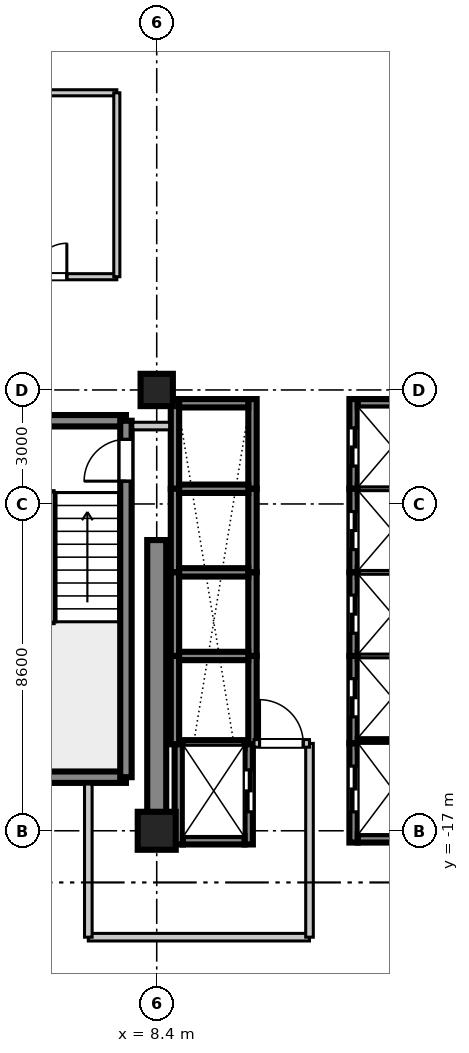
"""IFC4 building model, lengths in metres.
Left out: names, types, materials, properties, quantities, classifications, styles, units other than length and angle.
Written with IfcOpenShell. Run it as: python <this file> out.ifc"""

import sys

from ifc_helpers import new_model, si_unit, direction, frame, frame_2d, origin, origin_2d, place, context, subcontext, project, spatial, rectangle, extrude, source, transform, mapped, element, fill, save


model = new_model("IFC4")
c1 = context("Model", 3, precision=1e-05, world=origin(), true_north=direction((0.0, 1.0)))
c2 = subcontext(c1, "Body", "Model", "MODEL_VIEW")
j1 = project(units=[si_unit("LENGTHUNIT", "METRE"), si_unit("PLANEANGLEUNIT", "RADIAN")], contexts=[c1])
p1 = place(None, origin())
s1 = spatial("IfcSite", under=j1, at=p1, CompositionType="ELEMENT")
p2 = place(p1, origin())
s2 = spatial("IfcBuilding", under=s1, at=p2, CompositionType="ELEMENT")
p3 = place(p2, frame((0.0, 0.0, 212.3)))
s3 = spatial("IfcBuildingStorey", under=s2, at=p3, CompositionType="ELEMENT", Elevation=212.3)
m1 = source(origin(), c2, "Body", "SweptSolid", [
    extrude(rectangle(XDim=1.0, YDim=1.0, at=origin_2d()), origin(), (0.0, 0.0, 1.0), 3.655),
])
p4 = place(p3, frame((8.4, -17.0, 0.0), z_axis=(0.0, 0.0, 1.0), x_axis=(1.0, 0.0, 0.0)))
e1 = element("IfcColumn", 1, at=p4, inside=s3, PredefinedType="COLUMN", context=c2, shape_type="MappedRepresentation", body=[
    mapped(m1, transform((0.0, 0.0, 0.0), scale=1.0)),
])
m2 = source(origin(), c2, "Body", "SweptSolid", [
    extrude(rectangle(XDim=0.85, YDim=0.85, at=origin_2d()), origin(), (0.0, 0.0, 1.0), 3.655),
])
p5 = place(p3, frame((8.4, -5.4, 0.0), z_axis=(0.0, 0.0, 1.0), x_axis=(1.0, 0.0, 0.0)))
e2 = element("IfcColumn", 2, at=p5, inside=s3, PredefinedType="PILASTER", context=c2, shape_type="MappedRepresentation", body=[
    mapped(m2, transform((0.0, 0.0, 0.0), scale=1.0)),
])
m3 = source(origin(), c2, "Body", "SweptSolid", [
    extrude(rectangle(XDim=7.65, YDim=0.5, at=frame_2d((3.825, 0.0))), origin(), (0.0, 0.0, 1.0), 3.41),
])
p6 = place(p3, frame((8.4, -17.0, 0.0), z_axis=(0.0, 0.0, 1.0), x_axis=(0.0, 1.0, 0.0)))
e3 = element("IfcWall", 3, at=p6, inside=s3, PredefinedType="SHEAR", context=c2, shape_type="MappedRepresentation", body=[
    mapped(m3, transform((0.0, 0.0, 0.0), scale=1.0)),
])
m4 = source(origin(), c2, "Body", "SweptSolid", [
    extrude(rectangle(XDim=3.98, YDim=0.3, at=frame_2d((1.99, 0.0))), origin(), (0.0, 0.0, 1.0), 3.41),
])
for number, where, z_axis, x_axis in (
    (4, (3.61, -15.59, 0.0), (0.0, 0.0, 1.0), (1.0, 0.0, 0.0)),
    (5, (3.61, -6.21, 0.0), (0.0, 0.0, 1.0), (1.0, 0.0, 0.0)),
):
    element("IfcWall", number, at=place(p3, frame(where, z_axis=z_axis, x_axis=x_axis)), inside=s3, PredefinedType="SHEAR", context=c2, shape_type="MappedRepresentation", body=[
        mapped(m4, transform((0.0, 0.0, 0.0), scale=1.0)),
    ])
m5 = source(origin(), c2, "Body", "SweptSolid", [
    extrude(rectangle(XDim=9.38, YDim=0.3, at=frame_2d((4.69, 0.0))), origin(), (0.0, 0.0, 1.0), 3.41),
])
p7 = place(p3, frame((7.59, -15.59, 0.0), z_axis=(0.0, 0.0, 1.0), x_axis=(0.0, 1.0, 0.0)))
e6 = element("IfcWall", 6, at=p7, inside=s3, PredefinedType="SHEAR", context=c2, shape_type="MappedRepresentation", body=[
    mapped(m5, transform((0.0, 0.0, 0.0), scale=1.0)),
])
p8 = place(p7, frame((7.79, 0.0, 0.0)))
e7 = element("IfcOpeningElement", 7, at=p8, cuts=e6, PredefinedType="OPENING", context=c2, shape_type="SweptSolid", body=[
    extrude(rectangle(XDim=1.1, YDim=2.15, at=frame_2d((0.55, 1.075))), frame((0.0, 0.16, 0.0), z_axis=(0.0, -1.0, 0.0), x_axis=(1.0, 0.0, 0.0)), (0.0, 0.0, 1.0), 0.32),
])
m6 = source(origin(), c2, "Body", "SweptSolid", [
    extrude(rectangle(XDim=2.36, YDim=0.22, at=frame_2d((1.18, 0.0))), origin(), (0.0, 0.0, 1.0), 3.41),
])
p9 = place(p3, frame((13.58, -8.0, 0.0), z_axis=(0.0, 0.0, 1.0), x_axis=(0.0, 1.0, 0.0)))
e8 = element("IfcWall", 8, at=p9, inside=s3, PredefinedType="SHEAR", context=c2, shape_type="MappedRepresentation", body=[
    mapped(m6, transform((0.0, 0.0, 0.0), scale=1.0)),
])
p10 = place(p9, frame((0.6, 0.0, 0.0)))
e9 = element("IfcOpeningElement", 9, at=p10, cuts=e8, PredefinedType="OPENING", context=c2, shape_type="SweptSolid", body=[
    extrude(rectangle(XDim=1.0, YDim=2.2, at=frame_2d((0.5, 1.1))), frame((0.0, 0.12, 0.0), z_axis=(0.0, -1.0, 0.0), x_axis=(1.0, 0.0, 0.0)), (0.0, 0.0, 1.0), 0.24),
])
m7 = source(origin(), c2, "Body", "SweptSolid", [
    extrude(rectangle(XDim=1.82, YDim=0.22, at=frame_2d((0.91, 0.0))), origin(), (0.0, 0.0, 1.0), 3.41),
])
p11 = place(p3, frame((13.69, -5.75, 0.0), z_axis=(0.0, 0.0, 1.0), x_axis=(1.0, 0.0, 0.0)))
e10 = element("IfcWall", 10, at=p11, inside=s3, PredefinedType="SHEAR", context=c2, shape_type="MappedRepresentation", body=[
    mapped(m7, transform((0.0, 0.0, 0.0), scale=1.0)),
])
m8 = source(origin(), c2, "Body", "SweptSolid", [
    extrude(rectangle(XDim=2.2, YDim=0.22, at=frame_2d((1.1, 0.0))), origin(), (0.0, 0.0, 1.0), 3.41),
])
p12 = place(p3, frame((13.58, -10.2, 0.0), z_axis=(0.0, 0.0, 1.0), x_axis=(0.0, 1.0, 0.0)))
e11 = element("IfcWall", 11, at=p12, inside=s3, PredefinedType="SHEAR", context=c2, shape_type="MappedRepresentation", body=[
    mapped(m8, transform((0.0, 0.0, 0.0), scale=1.0)),
])
p13 = place(p12, frame((0.6, 0.0, 0.0)))
e12 = element("IfcOpeningElement", 12, at=p13, cuts=e11, PredefinedType="OPENING", context=c2, shape_type="SweptSolid", body=[
    extrude(rectangle(XDim=1.0, YDim=2.2, at=frame_2d((0.5, 1.1))), frame((0.0, 0.12, 0.0), z_axis=(0.0, -1.0, 0.0), x_axis=(1.0, 0.0, 0.0)), (0.0, 0.0, 1.0), 0.24),
])
m9 = source(origin(), c2, "Body", "SweptSolid", [
    extrude(rectangle(XDim=1.82, YDim=0.22, at=frame_2d((0.91, 0.0))), origin(), (0.0, 0.0, 1.0), 3.7),
])
p14 = place(p3, frame((13.69, -8.0, 0.0), z_axis=(0.0, 0.0, 1.0), x_axis=(1.0, 0.0, 0.0)))
e13 = element("IfcWall", 13, at=p14, inside=s3, PredefinedType="SHEAR", context=c2, shape_type="MappedRepresentation", body=[
    mapped(m9, transform((0.0, 0.0, 0.0), scale=1.0)),
])
p15 = place(p3, frame((13.58, -12.4, 0.0), z_axis=(0.0, 0.0, 1.0), x_axis=(0.0, 1.0, 0.0)))
e14 = element("IfcWall", 14, at=p15, inside=s3, PredefinedType="SHEAR", context=c2, shape_type="MappedRepresentation", body=[
    mapped(m8, transform((0.0, 0.0, 0.0), scale=1.0)),
])
p16 = place(p15, frame((0.6, 0.0, 0.0)))
e15 = element("IfcOpeningElement", 15, at=p16, cuts=e14, PredefinedType="OPENING", context=c2, shape_type="SweptSolid", body=[
    extrude(rectangle(XDim=1.0, YDim=2.2, at=frame_2d((0.5, 1.1))), frame((0.0, 0.12, 0.0), z_axis=(0.0, -1.0, 0.0), x_axis=(1.0, 0.0, 0.0)), (0.0, 0.0, 1.0), 0.24),
])
p17 = place(p3, frame((13.69, -10.2, 0.0), z_axis=(0.0, 0.0, 1.0), x_axis=(1.0, 0.0, 0.0)))
e16 = element("IfcWall", 16, at=p17, inside=s3, PredefinedType="SHEAR", context=c2, shape_type="MappedRepresentation", body=[
    mapped(m9, transform((0.0, 0.0, 0.0), scale=1.0)),
])
m10 = source(origin(), c2, "Body", "SweptSolid", [
    extrude(rectangle(XDim=2.3, YDim=0.22, at=frame_2d((1.15, 0.0))), origin(), (0.0, 0.0, 1.0), 3.41),
])
p18 = place(p3, frame((13.58, -14.7, 0.0), z_axis=(0.0, 0.0, 1.0), x_axis=(0.0, 1.0, 0.0)))
e17 = element("IfcWall", 17, at=p18, inside=s3, PredefinedType="SHEAR", context=c2, shape_type="MappedRepresentation", body=[
    mapped(m10, transform((0.0, 0.0, 0.0), scale=1.0)),
])
p19 = place(p18, frame((0.7, 0.0, 0.0)))
e18 = element("IfcOpeningElement", 18, at=p19, cuts=e17, PredefinedType="OPENING", context=c2, shape_type="SweptSolid", body=[
    extrude(rectangle(XDim=1.0, YDim=2.2, at=frame_2d((0.5, 1.1))), frame((0.0, 0.12, 0.0), z_axis=(0.0, -1.0, 0.0), x_axis=(1.0, 0.0, 0.0)), (0.0, 0.0, 1.0), 0.24),
])
p20 = place(p3, frame((13.69, -12.4, 0.0), z_axis=(0.0, 0.0, 1.0), x_axis=(1.0, 0.0, 0.0)))
e19 = element("IfcWall", 19, at=p20, inside=s3, PredefinedType="SHEAR", context=c2, shape_type="MappedRepresentation", body=[
    mapped(m9, transform((0.0, 0.0, 0.0), scale=1.0)),
])
for number, where, z_axis, x_axis in (
    (20, (8.88, -8.0, 0.0), (0.0, 0.0, 1.0), (0.0, 1.0, 0.0)),
    (21, (10.92, -8.0, 0.0), (0.0, 0.0, 1.0), (0.0, 1.0, 0.0)),
):
    element("IfcWall", number, at=place(p3, frame(where, z_axis=z_axis, x_axis=x_axis)), inside=s3, PredefinedType="SHEAR", context=c2, shape_type="MappedRepresentation", body=[
        mapped(m6, transform((0.0, 0.0, 0.0), scale=1.0)),
    ])
p21 = place(p3, frame((8.99, -5.75, 0.0), z_axis=(0.0, 0.0, 1.0), x_axis=(1.0, 0.0, 0.0)))
e22 = element("IfcWall", 22, at=p21, inside=s3, PredefinedType="SHEAR", context=c2, shape_type="MappedRepresentation", body=[
    mapped(m7, transform((0.0, 0.0, 0.0), scale=1.0)),
])
for number, where, z_axis, x_axis in (
    (23, (8.88, -10.2, 0.0), (0.0, 0.0, 1.0), (0.0, 1.0, 0.0)),
    (24, (10.92, -10.2, 0.0), (0.0, 0.0, 1.0), (0.0, 1.0, 0.0)),
):
    element("IfcWall", number, at=place(p3, frame(where, z_axis=z_axis, x_axis=x_axis)), inside=s3, PredefinedType="SHEAR", context=c2, shape_type="MappedRepresentation", body=[
        mapped(m8, transform((0.0, 0.0, 0.0), scale=1.0)),
    ])
p22 = place(p3, frame((8.99, -8.0, 0.0), z_axis=(0.0, 0.0, 1.0), x_axis=(1.0, 0.0, 0.0)))
e25 = element("IfcWall", 25, at=p22, inside=s3, PredefinedType="SHEAR", context=c2, shape_type="MappedRepresentation", body=[
    mapped(m9, transform((0.0, 0.0, 0.0), scale=1.0)),
])
for number, where, z_axis, x_axis in (
    (26, (8.88, -12.4, 0.0), (0.0, 0.0, 1.0), (0.0, 1.0, 0.0)),
    (27, (10.92, -12.4, 0.0), (0.0, 0.0, 1.0), (0.0, 1.0, 0.0)),
):
    element("IfcWall", number, at=place(p3, frame(where, z_axis=z_axis, x_axis=x_axis)), inside=s3, PredefinedType="SHEAR", context=c2, shape_type="MappedRepresentation", body=[
        mapped(m8, transform((0.0, 0.0, 0.0), scale=1.0)),
    ])
p23 = place(p3, frame((8.99, -10.2, 0.0), z_axis=(0.0, 0.0, 1.0), x_axis=(1.0, 0.0, 0.0)))
e28 = element("IfcWall", 28, at=p23, inside=s3, PredefinedType="SHEAR", context=c2, shape_type="MappedRepresentation", body=[
    mapped(m9, transform((0.0, 0.0, 0.0), scale=1.0)),
])
m11 = source(origin(), c2, "Body", "SweptSolid", [
    extrude(rectangle(XDim=2.325, YDim=0.22, at=frame_2d((1.163, 0.0))), origin(), (0.0, 0.0, 1.0), 3.41),
])
for number, where, z_axis, x_axis in (
    (29, (8.88, -14.725, 0.0), (0.0, 0.0, 1.0), (0.0, 1.0, 0.0)),
    (30, (10.92, -14.725, 0.0), (0.0, 0.0, 1.0), (0.0, 1.0, 0.0)),
):
    element("IfcWall", number, at=place(p3, frame(where, z_axis=z_axis, x_axis=x_axis)), inside=s3, PredefinedType="SHEAR", context=c2, shape_type="MappedRepresentation", body=[
        mapped(m11, transform((0.0, 0.0, 0.0), scale=1.0)),
    ])
p24 = place(p3, frame((8.99, -12.4, 0.0), z_axis=(0.0, 0.0, 1.0), x_axis=(1.0, 0.0, 0.0)))
e31 = element("IfcWall", 31, at=p24, inside=s3, PredefinedType="SHEAR", context=c2, shape_type="MappedRepresentation", body=[
    mapped(m9, transform((0.0, 0.0, 0.0), scale=1.0)),
])
m12 = source(origin(), c2, "Body", "SweptSolid", [
    extrude(rectangle(XDim=2.635, YDim=0.22, at=frame_2d((1.317, 0.0))), origin(), (0.0, 0.0, 1.0), 3.41),
])
p25 = place(p3, frame((8.98, -17.36, 0.0), z_axis=(0.0, 0.0, 1.0), x_axis=(0.0, 1.0, 0.0)))
e32 = element("IfcWall", 32, at=p25, inside=s3, PredefinedType="SHEAR", context=c2, shape_type="MappedRepresentation", body=[
    mapped(m12, transform((0.0, 0.0, 0.0), scale=1.0)),
])
p26 = place(p3, frame((10.82, -17.36, 0.0), z_axis=(0.0, 0.0, 1.0), x_axis=(0.0, 1.0, 0.0)))
e33 = element("IfcWall", 33, at=p26, inside=s3, PredefinedType="SHEAR", context=c2, shape_type="MappedRepresentation", body=[
    mapped(m12, transform((0.0, 0.0, 0.0), scale=1.0)),
])
p27 = place(p26, frame((0.86, 0.0, 0.0)))
e34 = element("IfcOpeningElement", 34, at=p27, cuts=e33, PredefinedType="OPENING", context=c2, shape_type="SweptSolid", body=[
    extrude(rectangle(XDim=1.1, YDim=2.2, at=frame_2d((0.55, 1.1))), frame((0.0, 0.12, 0.0), z_axis=(0.0, -1.0, 0.0), x_axis=(1.0, 0.0, 0.0)), (0.0, 0.0, 1.0), 0.24),
])
m13 = source(origin(), c2, "Body", "SweptSolid", [
    extrude(rectangle(XDim=1.62, YDim=0.22, at=frame_2d((0.81, 0.0))), origin(), (0.0, 0.0, 1.0), 3.41),
])
p28 = place(p3, frame((9.09, -17.25, 0.0), z_axis=(0.0, 0.0, 1.0), x_axis=(1.0, 0.0, 0.0)))
e35 = element("IfcWall", 35, at=p28, inside=s3, PredefinedType="SHEAR", context=c2, shape_type="MappedRepresentation", body=[
    mapped(m13, transform((0.0, 0.0, 0.0), scale=1.0)),
])
m14 = source(origin(), c2, "Body", "SweptSolid", [
    extrude(rectangle(XDim=1.62, YDim=0.22, at=frame_2d((0.81, 0.0))), origin(), (0.0, 0.0, 1.0), 3.7),
])
p29 = place(p3, frame((9.09, -14.725, 0.0), z_axis=(0.0, 0.0, 1.0), x_axis=(1.0, 0.0, 0.0)))
e36 = element("IfcWall", 36, at=p29, inside=s3, PredefinedType="SHEAR", context=c2, shape_type="MappedRepresentation", body=[
    mapped(m14, transform((0.0, 0.0, 0.0), scale=1.0)),
])
m15 = source(origin(), c2, "Body", "SweptSolid", [
    extrude(rectangle(XDim=2.61, YDim=0.22, at=frame_2d((1.305, 0.0))), origin(), (0.0, 0.0, 1.0), 3.41),
])
p30 = place(p3, frame((13.58, -17.31, 0.0), z_axis=(0.0, 0.0, 1.0), x_axis=(0.0, 1.0, 0.0)))
e37 = element("IfcWall", 37, at=p30, inside=s3, PredefinedType="SHEAR", context=c2, shape_type="MappedRepresentation", body=[
    mapped(m15, transform((0.0, 0.0, 0.0), scale=1.0)),
])
p31 = place(p30, frame((0.81, 0.0, 0.0)))
e38 = element("IfcOpeningElement", 38, at=p31, cuts=e37, PredefinedType="OPENING", context=c2, shape_type="SweptSolid", body=[
    extrude(rectangle(XDim=1.2, YDim=2.2, at=frame_2d((0.6, 1.1))), frame((0.0, 0.12, 0.0), z_axis=(0.0, -1.0, 0.0), x_axis=(1.0, 0.0, 0.0)), (0.0, 0.0, 1.0), 0.24),
])
p32 = place(p3, frame((13.69, -17.2, 0.0), z_axis=(0.0, 0.0, 1.0), x_axis=(1.0, 0.0, 0.0)))
e39 = element("IfcWall", 39, at=p32, inside=s3, PredefinedType="SHEAR", context=c2, shape_type="MappedRepresentation", body=[
    mapped(m7, transform((0.0, 0.0, 0.0), scale=1.0)),
])
p33 = place(p3, frame((13.69, -14.7, 0.0), z_axis=(0.0, 0.0, 1.0), x_axis=(1.0, 0.0, 0.0)))
e40 = element("IfcWall", 40, at=p33, inside=s3, PredefinedType="SHEAR", context=c2, shape_type="MappedRepresentation", body=[
    mapped(m9, transform((0.0, 0.0, 0.0), scale=1.0)),
])
m16 = source(origin(), c2, "Body", "SweptSolid", [
    extrude(rectangle(XDim=5.82, YDim=0.2, at=frame_2d((2.91, 0.0))), origin(), (0.0, 0.0, 1.0), 2.75),
])
p34 = place(p3, frame((6.6, -19.8, 0.0), z_axis=(0.0, 0.0, 1.0), x_axis=(1.0, 0.0, 0.0)))
e41 = element("IfcWall", 41, at=p34, inside=s3, PredefinedType="PARTITIONING", context=c2, shape_type="MappedRepresentation", body=[
    mapped(m16, transform((0.0, 0.0, 0.0), scale=1.0)),
])
m17 = source(origin(), c2, "Body", "SweptSolid", [
    extrude(rectangle(XDim=4.03, YDim=0.2, at=frame_2d((2.015, 0.0))), origin(), (0.0, 0.0, 1.0), 2.75),
])
p35 = place(p3, frame((6.6, -19.8, 0.0), z_axis=(0.0, 0.0, 1.0), x_axis=(0.0, 1.0, 0.0)))
e42 = element("IfcWall", 42, at=p35, inside=s3, PredefinedType="PARTITIONING", context=c2, shape_type="MappedRepresentation", body=[
    mapped(m17, transform((0.0, 0.0, 0.0), scale=1.0)),
])
m18 = source(origin(), c2, "Body", "SweptSolid", [
    extrude(rectangle(XDim=5.1, YDim=0.2, at=frame_2d((2.55, 0.0))), origin(), (0.0, 0.0, 1.0), 2.75),
])
p36 = place(p3, frame((12.42, -19.8, 0.0), z_axis=(0.0, 0.0, 1.0), x_axis=(0.0, 1.0, 0.0)))
e43 = element("IfcWall", 43, at=p36, inside=s3, PredefinedType="PARTITIONING", context=c2, shape_type="MappedRepresentation", body=[
    mapped(m18, transform((0.0, 0.0, 0.0), scale=1.0)),
])
m19 = source(origin(), c2, "Body", "SweptSolid", [
    extrude(rectangle(XDim=1.46, YDim=0.2, at=frame_2d((0.73, 0.0))), origin(), (0.0, 0.0, 1.0), 2.75),
])
p37 = place(p3, frame((10.96, -14.7, 0.0), z_axis=(0.0, 0.0, 1.0), x_axis=(1.0, 0.0, 0.0)))
e44 = element("IfcWall", 44, at=p37, inside=s3, PredefinedType="PARTITIONING", context=c2, shape_type="MappedRepresentation", body=[
    mapped(m19, transform((0.0, 0.0, 0.0), scale=1.0)),
])
p38 = place(p37, frame((0.145, 0.0, 0.0)))
e45 = element("IfcOpeningElement", 45, at=p38, cuts=e44, PredefinedType="OPENING", context=c2, shape_type="SweptSolid", body=[
    extrude(rectangle(XDim=1.15, YDim=2.15, at=frame_2d((0.575, 1.075))), frame((0.0, 0.11, 0.0), z_axis=(0.0, -1.0, 0.0), x_axis=(1.0, 0.0, 0.0)), (0.0, 0.0, 1.0), 0.22),
])
m20 = source(origin(), c2, "Body", "SweptSolid", [
    extrude(rectangle(XDim=0.97, YDim=0.2, at=frame_2d((0.485, 0.0))), origin(), (0.0, 0.0, 1.0), 2.75),
])
p39 = place(p3, frame((7.77, -6.35, 0.0), z_axis=(0.0, 0.0, 1.0), x_axis=(1.0, 0.0, 0.0)))
e46 = element("IfcWall", 46, at=p39, inside=s3, PredefinedType="PARTITIONING", context=c2, shape_type="MappedRepresentation", body=[
    mapped(m20, transform((0.0, 0.0, 0.0), scale=1.0)),
])
m21 = source(origin(), c2, "Body", "SweptSolid", [
    extrude(rectangle(XDim=4.128, YDim=0.16, at=frame_2d((2.064, 0.0))), origin(), (0.0, 0.0, 1.0), 2.75),
])
p40 = place(p3, frame((3.222, -2.42, 0.0), z_axis=(0.0, 0.0, 1.0), x_axis=(1.0, 0.0, 0.0)))
e47 = element("IfcWall", 47, at=p40, inside=s3, PredefinedType="PARTITIONING", context=c2, shape_type="MappedRepresentation", body=[
    mapped(m21, transform((0.0, 0.0, 0.0), scale=1.0)),
])
p41 = place(p40, frame((1.933, 0.0, 0.0)))
e48 = element("IfcOpeningElement", 48, at=p41, cuts=e47, PredefinedType="OPENING", context=c2, shape_type="SweptSolid", body=[
    extrude(rectangle(XDim=0.88, YDim=2.1, at=frame_2d((0.44, 1.05))), frame((0.0, 0.09, 0.0), z_axis=(0.0, -1.0, 0.0), x_axis=(1.0, 0.0, 0.0)), (0.0, 0.0, 1.0), 0.18),
])
p42 = place(p3, frame((3.222, 2.42, 0.0), z_axis=(0.0, 0.0, 1.0), x_axis=(1.0, 0.0, 0.0)))
e49 = element("IfcWall", 49, at=p42, inside=s3, PredefinedType="PARTITIONING", context=c2, shape_type="MappedRepresentation", body=[
    mapped(m21, transform((0.0, 0.0, 0.0), scale=1.0)),
])
m22 = source(origin(), c2, "Body", "SweptSolid", [
    extrude(rectangle(XDim=4.84, YDim=0.16, at=frame_2d((2.42, 0.0))), origin(), (0.0, 0.0, 1.0), 2.75),
])
p43 = place(p3, frame((7.35, -2.42, 0.0), z_axis=(0.0, 0.0, 1.0), x_axis=(0.0, 1.0, 0.0)))
e50 = element("IfcWall", 50, at=p43, inside=s3, PredefinedType="PARTITIONING", context=c2, shape_type="MappedRepresentation", body=[
    mapped(m22, transform((0.0, 0.0, 0.0), scale=1.0)),
])
m23 = source(origin(), c2, "Body", "SweptSolid", [
    extrude(rectangle(XDim=1.1, YDim=2.15, at=frame_2d((0.55, 1.075))), frame((0.0, 0.025, 0.0), z_axis=(0.0, -1.0, 0.0), x_axis=(1.0, 0.0, 0.0)), (0.0, 0.0, 1.0), 0.05),
])
p44 = place(p8, origin())
e51 = element("IfcDoor", 51, at=p44, inside=s3, OperationType="SINGLE_SWING_LEFT", PredefinedType="DOOR", context=c2, shape_type="MappedRepresentation", body=[
    mapped(m23, transform((0.0, 0.0, 0.0), scale=1.0)),
])
fill(e7, e51)
m24 = source(origin(), c2, "Body", "SweptSolid", [
    extrude(rectangle(XDim=1.0, YDim=2.2, at=frame_2d((0.5, 1.1))), frame((0.0, 0.025, 0.0), z_axis=(0.0, -1.0, 0.0), x_axis=(1.0, 0.0, 0.0)), (0.0, 0.0, 1.0), 0.05),
])
p45 = place(p10, origin())
e52 = element("IfcDoor", 52, at=p45, inside=s3, OperationType="DOUBLE_DOOR_SLIDING", PredefinedType="DOOR", context=c2, shape_type="MappedRepresentation", body=[
    mapped(m24, transform((0.0, 0.0, 0.0), scale=1.0)),
])
fill(e9, e52)
p46 = place(p13, origin())
e53 = element("IfcDoor", 53, at=p46, inside=s3, OperationType="DOUBLE_DOOR_SLIDING", PredefinedType="DOOR", context=c2, shape_type="MappedRepresentation", body=[
    mapped(m24, transform((0.0, 0.0, 0.0), scale=1.0)),
])
fill(e12, e53)
p47 = place(p16, origin())
e54 = element("IfcDoor", 54, at=p47, inside=s3, OperationType="DOUBLE_DOOR_SLIDING", PredefinedType="DOOR", context=c2, shape_type="MappedRepresentation", body=[
    mapped(m24, transform((0.0, 0.0, 0.0), scale=1.0)),
])
fill(e15, e54)
p48 = place(p19, origin())
e55 = element("IfcDoor", 55, at=p48, inside=s3, OperationType="DOUBLE_DOOR_SLIDING", PredefinedType="DOOR", context=c2, shape_type="MappedRepresentation", body=[
    mapped(m24, transform((0.0, 0.0, 0.0), scale=1.0)),
])
fill(e18, e55)
m25 = source(origin(), c2, "Body", "SweptSolid", [
    extrude(rectangle(XDim=1.1, YDim=2.2, at=frame_2d((0.55, 1.1))), frame((0.0, 0.025, 0.0), z_axis=(0.0, -1.0, 0.0), x_axis=(1.0, 0.0, 0.0)), (0.0, 0.0, 1.0), 0.05),
])
p49 = place(p27, frame((1.1, 0.0, 0.0), z_axis=(0.0, 0.0, 1.0), x_axis=(-1.0, 0.0, 0.0)))
e56 = element("IfcDoor", 56, at=p49, inside=s3, OperationType="DOUBLE_DOOR_SLIDING", PredefinedType="DOOR", context=c2, shape_type="MappedRepresentation", body=[
    mapped(m25, transform((0.0, 0.0, 0.0), scale=1.0)),
])
fill(e34, e56)
m26 = source(origin(), c2, "Body", "SweptSolid", [
    extrude(rectangle(XDim=1.2, YDim=2.2, at=frame_2d((0.6, 1.1))), frame((0.0, 0.025, 0.0), z_axis=(0.0, -1.0, 0.0), x_axis=(1.0, 0.0, 0.0)), (0.0, 0.0, 1.0), 0.05),
])
p50 = place(p31, origin())
e57 = element("IfcDoor", 57, at=p50, inside=s3, OperationType="DOUBLE_DOOR_SLIDING", PredefinedType="DOOR", context=c2, shape_type="MappedRepresentation", body=[
    mapped(m26, transform((0.0, 0.0, 0.0), scale=1.0)),
])
fill(e38, e57)
m27 = source(origin(), c2, "Body", "SweptSolid", [
    extrude(rectangle(XDim=1.15, YDim=2.15, at=frame_2d((0.575, 1.075))), frame((0.0, 0.025, 0.0), z_axis=(0.0, -1.0, 0.0), x_axis=(1.0, 0.0, 0.0)), (0.0, 0.0, 1.0), 0.05),
])
p51 = place(p38, origin())
e58 = element("IfcDoor", 58, at=p51, inside=s3, OperationType="SINGLE_SWING_LEFT", PredefinedType="DOOR", context=c2, shape_type="MappedRepresentation", body=[
    mapped(m27, transform((0.0, 0.0, 0.0), scale=1.0)),
])
fill(e45, e58)
m28 = source(origin(), c2, "Body", "SweptSolid", [
    extrude(rectangle(XDim=0.88, YDim=2.1, at=frame_2d((0.44, 1.05))), frame((0.0, 0.025, 0.0), z_axis=(0.0, -1.0, 0.0), x_axis=(1.0, 0.0, 0.0)), (0.0, 0.0, 1.0), 0.05),
])
p52 = place(p41, origin())
e59 = element("IfcDoor", 59, at=p52, inside=s3, OperationType="SINGLE_SWING_RIGHT", PredefinedType="DOOR", context=c2, shape_type="MappedRepresentation", body=[
    mapped(m28, transform((0.0, 0.0, 0.0), scale=1.0)),
])
fill(e48, e59)
save(model, sys.argv[1])
